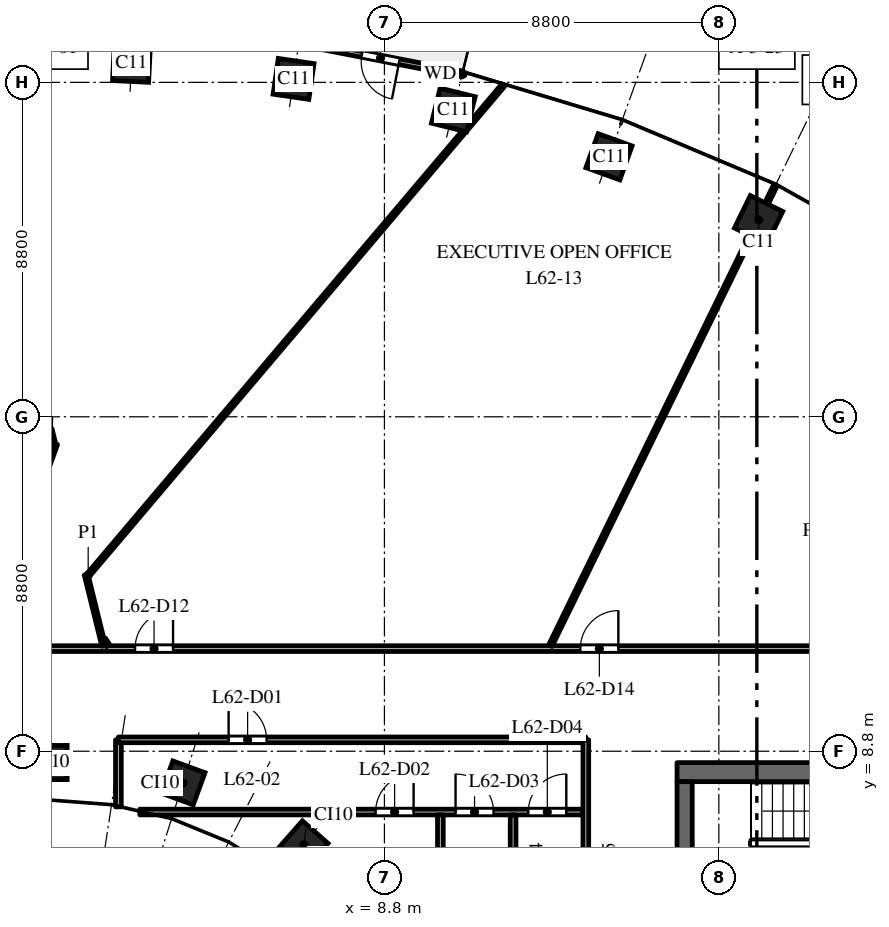
"""IFC4 building model, lengths in metres.
Left out: names, types, materials, properties, quantities, classifications, styles, units other than length and angle.
Written with IfcOpenShell. Run it as: python <this file> out.ifc"""

import sys

from ifc_helpers import new_model, si_unit, direction, frame, frame_2d, origin, origin_2d, place, context, subcontext, project, spatial, rectangle, extrude, element, fill, save


model = new_model("IFC4")
c1 = context("Model", 3, precision=1e-05, world=origin(), true_north=direction((0.0, 1.0)))
c2 = subcontext(c1, "Body", "Model", "MODEL_VIEW")
j1 = project(units=[si_unit("LENGTHUNIT", "METRE"), si_unit("PLANEANGLEUNIT", "RADIAN")], contexts=[c1])
p1 = place(None, origin())
s1 = spatial("IfcSite", under=j1, at=p1, CompositionType="ELEMENT")
p2 = place(p1, origin())
s2 = spatial("IfcBuilding", under=s1, at=p2, CompositionType="ELEMENT")
p3 = place(p2, frame((0.0, 0.0, 291.0)))
s3 = spatial("IfcBuildingStorey", under=s2, at=p3, CompositionType="ELEMENT", Elevation=291.0)
for number, where, z_axis, x_axis in (
    (1, (18.646, 22.785, 0.0), (0.0, 0.0, 1.0), (-0.898, 0.439, 0.0)),
    (2, (14.709, 24.441, 0.0), (0.0, 0.0, 1.0), (-0.941, 0.338, 0.0)),
    (3, (10.613, 25.674, 0.0), (0.0, 0.0, 1.0), (-0.971, 0.24, 0.0)),
    (4, (6.409, 26.491, 0.0), (0.0, 0.0, 1.0), (-0.99, 0.143, 0.0)),
    (5, (2.143, 26.898, 0.0), (0.0, 0.0, 1.0), (-0.999, 0.048, 0.0)),
):
    element("IfcColumn", number, at=place(p3, frame(where, z_axis=z_axis, x_axis=x_axis)), inside=s3, PredefinedType="COLUMN", context=c2, shape_type="SweptSolid", body=[
        extrude(rectangle(XDim=0.95, YDim=0.95, at=origin_2d()), origin(), (0.0, 0.0, 1.0), 4.0),
    ])
for number, where, z_axis, x_axis in (
    (6, (6.682, 6.334, 0.0), (0.0, 0.0, 1.0), (-0.751, 0.66, 0.0)),
    (7, (3.501, 7.967, 0.0), (0.0, 0.0, 1.0), (-0.939, 0.344, 0.0)),
    (8, (0.0, 8.503, 0.0), (0.0, 0.0, 1.0), (-1.0, 0.0, 0.0)),
):
    element("IfcColumn", number, at=place(p3, frame(where, z_axis=z_axis, x_axis=x_axis)), inside=s3, PredefinedType="COLUMN", context=c2, shape_type="SweptSolid", body=[
        extrude(rectangle(XDim=0.9, YDim=0.9, at=origin_2d()), origin(), (0.0, 0.0, 1.0), 4.0),
    ])
p4 = place(p3, frame((16.5, 8.25, 0.0), z_axis=(0.0, 0.0, 1.0), x_axis=(1.0, 0.0, 0.0)))
e9 = element("IfcWall", 9, at=p4, inside=s3, PredefinedType="SHEAR", context=c2, shape_type="SweptSolid", body=[
    extrude(rectangle(XDim=15.0, YDim=0.5, at=frame_2d((7.5, 0.0))), origin(), (0.0, 0.0, 1.0), 3.7),
])
p5 = place(p4, frame((6.9, 0.0, 0.0)))
e10 = element("IfcOpeningElement", 10, at=p5, cuts=e9, PredefinedType="OPENING", context=c2, shape_type="SweptSolid", body=[
    extrude(rectangle(XDim=1.2, YDim=2.1, at=frame_2d((0.6, 1.05))), frame((0.0, 0.26, 0.0), z_axis=(0.0, -1.0, 0.0), x_axis=(1.0, 0.0, 0.0)), (0.0, 0.0, 1.0), 0.52),
])
p6 = place(p4, frame((12.275, 0.0, 0.0)))
e11 = element("IfcOpeningElement", 11, at=p6, cuts=e9, PredefinedType="OPENING", context=c2, shape_type="SweptSolid", body=[
    extrude(rectangle(XDim=0.9, YDim=2.1, at=frame_2d((0.45, 1.05))), frame((0.0, 0.26, 0.0), z_axis=(0.0, -1.0, 0.0), x_axis=(1.0, 0.0, 0.0)), (0.0, 0.0, 1.0), 0.52),
])
p7 = place(p3, frame((16.7, -8.0, 0.0), z_axis=(0.0, 0.0, 1.0), x_axis=(0.0, 1.0, 0.0)))
e12 = element("IfcWall", 12, at=p7, inside=s3, PredefinedType="SHEAR", context=c2, shape_type="SweptSolid", body=[
    extrude(rectangle(XDim=16.0, YDim=0.4, at=frame_2d((8.0, 0.0))), origin(), (0.0, 0.0, 1.0), 3.7),
])
p8 = place(p3, frame((10.871, 26.617, 0.0), z_axis=(0.0, 0.0, 1.0), x_axis=(-0.981631174778, 0.190788460615, 0.0)))
e13 = element("IfcWall", 13, at=p8, inside=s3, PredefinedType="STANDARD", context=c2, shape_type="SweptSolid", body=[
    extrude(rectangle(XDim=4.426, YDim=0.15, at=frame_2d((2.213, 0.0))), origin(), (0.0, 0.0, 1.0), 3.7),
])
p9 = place(p8, frame((1.713, 0.0, 0.0)))
e14 = element("IfcOpeningElement", 14, at=p9, cuts=e13, PredefinedType="OPENING", context=c2, shape_type="SweptSolid", body=[
    extrude(rectangle(XDim=1.0, YDim=2.4, at=frame_2d((0.5, 1.2))), frame((0.0, 0.085, 0.0), z_axis=(0.0, -1.0, 0.0), x_axis=(1.0, 0.0, 0.0)), (0.0, 0.0, 1.0), 0.17),
])
p10 = place(p3, frame((-31.5, 11.5, 0.0), z_axis=(0.0, 0.0, 1.0), x_axis=(1.0, 0.0, 0.0)))
e15 = element("IfcWall", 15, at=p10, inside=s3, PredefinedType="PARTITIONING", context=c2, shape_type="SweptSolid", body=[
    extrude(rectangle(XDim=63.0, YDim=0.15, at=frame_2d((31.5, 0.0))), origin(), (0.0, 0.0, 1.0), 2.75),
])
p11 = place(p10, frame((16.471, 0.0, 0.0)))
e16 = element("IfcOpeningElement", 16, at=p11, cuts=e15, PredefinedType="OPENING", context=c2, shape_type="SweptSolid", body=[
    extrude(rectangle(XDim=1.0, YDim=2.1, at=frame_2d((0.5, 1.05))), frame((0.0, 0.085, 0.0), z_axis=(0.0, -1.0, 0.0), x_axis=(1.0, 0.0, 0.0)), (0.0, 0.0, 1.0), 0.17),
])
p12 = place(p10, frame((19.062, 0.0, 0.0)))
e17 = element("IfcOpeningElement", 17, at=p12, cuts=e15, PredefinedType="OPENING", context=c2, shape_type="SweptSolid", body=[
    extrude(rectangle(XDim=1.0, YDim=2.1, at=frame_2d((0.5, 1.05))), frame((0.0, 0.085, 0.0), z_axis=(0.0, -1.0, 0.0), x_axis=(1.0, 0.0, 0.0)), (0.0, 0.0, 1.0), 0.17),
])
p13 = place(p10, frame((26.531, 0.0, 0.0)))
e18 = element("IfcOpeningElement", 18, at=p13, cuts=e15, PredefinedType="OPENING", context=c2, shape_type="SweptSolid", body=[
    extrude(rectangle(XDim=1.0, YDim=2.1, at=frame_2d((0.5, 1.05))), frame((0.0, 0.085, 0.0), z_axis=(0.0, -1.0, 0.0), x_axis=(1.0, 0.0, 0.0)), (0.0, 0.0, 1.0), 0.17),
])
p14 = place(p10, frame((33.738, 0.0, 0.0)))
e19 = element("IfcOpeningElement", 19, at=p14, cuts=e15, PredefinedType="OPENING", context=c2, shape_type="SweptSolid", body=[
    extrude(rectangle(XDim=1.0, YDim=2.1, at=frame_2d((0.5, 1.05))), frame((0.0, 0.085, 0.0), z_axis=(0.0, -1.0, 0.0), x_axis=(1.0, 0.0, 0.0)), (0.0, 0.0, 1.0), 0.17),
])
p15 = place(p10, frame((45.456, 0.0, 0.0)))
e20 = element("IfcOpeningElement", 20, at=p15, cuts=e15, PredefinedType="OPENING", context=c2, shape_type="SweptSolid", body=[
    extrude(rectangle(XDim=1.0, YDim=2.1, at=frame_2d((0.5, 1.05))), frame((0.0, 0.085, 0.0), z_axis=(0.0, -1.0, 0.0), x_axis=(1.0, 0.0, 0.0)), (0.0, 0.0, 1.0), 0.17),
])
p16 = place(p10, frame((57.85, 0.0, 0.0)))
e21 = element("IfcOpeningElement", 21, at=p16, cuts=e15, PredefinedType="OPENING", context=c2, shape_type="SweptSolid", body=[
    extrude(rectangle(XDim=1.0, YDim=2.1, at=frame_2d((0.5, 1.05))), frame((0.0, 0.085, 0.0), z_axis=(0.0, -1.0, 0.0), x_axis=(1.0, 0.0, 0.0)), (0.0, 0.0, 1.0), 0.17),
])
p17 = place(p3, frame((-0.041, 16.352, 0.0), z_axis=(0.0, 0.0, 1.0), x_axis=(0.339570618506, 0.940580562763, 0.0)))
e22 = element("IfcWall", 22, at=p17, inside=s3, PredefinedType="PARTITIONING", context=c2, shape_type="SweptSolid", body=[
    extrude(rectangle(XDim=0.569, YDim=0.1, at=frame_2d((0.284, 0.0))), origin(), (0.0, 0.0, 1.0), 3.7),
])
p18 = place(p3, frame((0.003, 17.282, 0.0), z_axis=(0.0, 0.0, 1.0), x_axis=(0.238966259399, -0.971027871314, 0.0)))
e23 = element("IfcWall", 23, at=p18, inside=s3, PredefinedType="PARTITIONING", context=c2, shape_type="SweptSolid", body=[
    extrude(rectangle(XDim=0.403, YDim=0.1, at=frame_2d((0.201, 0.0))), origin(), (0.0, 0.0, 1.0), 3.7),
])
p19 = place(p3, frame((0.95, 13.448, 0.0), z_axis=(0.0, 0.0, 1.0), x_axis=(0.239556864004, -0.970882335254, 0.0)))
e24 = element("IfcWall", 24, at=p19, inside=s3, PredefinedType="PARTITIONING", context=c2, shape_type="SweptSolid", body=[
    extrude(rectangle(XDim=1.929, YDim=0.1, at=frame_2d((0.965, 0.0))), origin(), (0.0, 0.0, 1.0), 3.7),
])
p20 = place(p3, frame((1.005, 13.435, 0.0), z_axis=(0.0, 0.0, 1.0), x_axis=(0.646459104718, 0.762948639115, 0.0)))
e25 = element("IfcWall", 25, at=p20, inside=s3, PredefinedType="PARTITIONING", context=c2, shape_type="SweptSolid", body=[
    extrude(rectangle(XDim=16.892, YDim=0.1, at=frame_2d((8.446, 0.0))), origin(), (0.0, 0.0, 1.0), 2.85),
])
p21 = place(p3, frame((1.416, 11.753, 0.0), z_axis=(0.0, 0.0, 1.0), x_axis=(0.542473755858, -0.840072749353, 0.0)))
e26 = element("IfcWall", 26, at=p21, inside=s3, PredefinedType="PARTITIONING", context=c2, shape_type="SweptSolid", body=[
    extrude(rectangle(XDim=0.208, YDim=0.1, at=frame_2d((0.104, 0.0))), origin(), (0.0, 0.0, 1.0), 3.7),
])
p22 = place(p3, frame((1.8, 7.336, 0.0), z_axis=(0.0, 0.0, 1.0), x_axis=(0.0, 1.0, 0.0)))
e27 = element("IfcWall", 27, at=p22, inside=s3, PredefinedType="PARTITIONING", context=c2, shape_type="SweptSolid", body=[
    extrude(rectangle(XDim=1.764, YDim=0.15, at=frame_2d((0.882, 0.0))), origin(), (0.0, 0.0, 1.0), 3.0),
])
p23 = place(p3, frame((1.8, 9.1, 0.0), z_axis=(0.0, 0.0, 1.0), x_axis=(1.0, 0.0, 0.0)))
e28 = element("IfcWall", 28, at=p23, inside=s3, PredefinedType="PARTITIONING", context=c2, shape_type="SweptSolid", body=[
    extrude(rectangle(XDim=12.3, YDim=0.15, at=frame_2d((6.15, 0.0))), origin(), (0.0, 0.0, 1.0), 2.85),
])
p24 = place(p23, frame((2.9, 0.0, 0.0)))
e29 = element("IfcOpeningElement", 29, at=p24, cuts=e28, PredefinedType="OPENING", context=c2, shape_type="SweptSolid", body=[
    extrude(rectangle(XDim=1.0, YDim=2.1, at=frame_2d((0.5, 1.05))), frame((0.0, 0.085, 0.0), z_axis=(0.0, -1.0, 0.0), x_axis=(1.0, 0.0, 0.0)), (0.0, 0.0, 1.0), 0.17),
])
p25 = place(p3, frame((2.364, 7.2, 0.0), z_axis=(0.0, 0.0, 1.0), x_axis=(1.0, 0.0, 0.0)))
e30 = element("IfcWall", 30, at=p25, inside=s3, PredefinedType="PARTITIONING", context=c2, shape_type="SweptSolid", body=[
    extrude(rectangle(XDim=11.661, YDim=0.15, at=frame_2d((5.831, 0.0))), origin(), (0.0, 0.0, 1.0), 2.75),
])
p26 = place(p25, frame((6.204, 0.0, 0.0)))
e31 = element("IfcOpeningElement", 31, at=p26, cuts=e30, PredefinedType="OPENING", context=c2, shape_type="SweptSolid", body=[
    extrude(rectangle(XDim=1.0, YDim=2.1, at=frame_2d((0.5, 1.05))), frame((0.0, 0.085, 0.0), z_axis=(0.0, -1.0, 0.0), x_axis=(1.0, 0.0, 0.0)), (0.0, 0.0, 1.0), 0.17),
])
p27 = place(p25, frame((8.308, 0.0, 0.0)))
e32 = element("IfcOpeningElement", 32, at=p27, cuts=e30, PredefinedType="OPENING", context=c2, shape_type="SweptSolid", body=[
    extrude(rectangle(XDim=1.0, YDim=2.1, at=frame_2d((0.5, 1.05))), frame((0.0, 0.085, 0.0), z_axis=(0.0, -1.0, 0.0), x_axis=(1.0, 0.0, 0.0)), (0.0, 0.0, 1.0), 0.17),
])
p28 = place(p25, frame((10.222, 0.0, 0.0)))
e33 = element("IfcOpeningElement", 33, at=p28, cuts=e30, PredefinedType="OPENING", context=c2, shape_type="SweptSolid", body=[
    extrude(rectangle(XDim=1.0, YDim=2.1, at=frame_2d((0.5, 1.05))), frame((0.0, 0.085, 0.0), z_axis=(0.0, -1.0, 0.0), x_axis=(1.0, 0.0, 0.0)), (0.0, 0.0, 1.0), 0.17),
])
for number, where, z_axis, x_axis in (
    (34, (10.272, 4.17, 0.0), (0.0, 0.0, 1.0), (0.0, 1.0, 0.0)),
    (35, (12.186, 4.17, 0.0), (0.0, 0.0, 1.0), (0.0, 1.0, 0.0)),
):
    element("IfcWall", number, at=place(p3, frame(where, z_axis=z_axis, x_axis=x_axis)), inside=s3, PredefinedType="PARTITIONING", context=c2, shape_type="SweptSolid", body=[
        extrude(rectangle(XDim=2.955, YDim=0.15, at=frame_2d((1.478, 0.0))), origin(), (0.0, 0.0, 1.0), 2.75),
    ])
p29 = place(p3, frame((13.167, 11.579, 0.0), z_axis=(0.0, 0.0, 1.0), x_axis=(0.439238726833, 0.898370380661, 0.0)))
e36 = element("IfcWall", 36, at=p29, inside=s3, PredefinedType="PARTITIONING", context=c2, shape_type="SweptSolid", body=[
    extrude(rectangle(XDim=13.475, YDim=0.1, at=frame_2d((6.738, 0.0))), origin(), (0.0, 0.0, 1.0), 3.0),
])
p30 = place(p3, frame((14.1, 4.095, 0.0), z_axis=(0.0, 0.0, 1.0), x_axis=(0.0, 1.0, 0.0)))
e37 = element("IfcWall", 37, at=p30, inside=s3, PredefinedType="PARTITIONING", context=c2, shape_type="SweptSolid", body=[
    extrude(rectangle(XDim=5.005, YDim=0.15, at=frame_2d((2.502, 0.0))), origin(), (0.0, 0.0, 1.0), 2.75),
])
p31 = place(p9, origin())
e38 = element("IfcDoor", 38, at=p31, inside=s3, OperationType="SINGLE_SWING_LEFT", PredefinedType="DOOR", context=c2, shape_type="SweptSolid", body=[
    extrude(rectangle(XDim=1.0, YDim=2.4, at=frame_2d((0.5, 1.2))), frame((0.0, 0.025, 0.0), z_axis=(0.0, -1.0, 0.0), x_axis=(1.0, 0.0, 0.0)), (0.0, 0.0, 1.0), 0.05),
])
fill(e14, e38)
p32 = place(p24, origin())
e39 = element("IfcDoor", 39, at=p32, inside=s3, OperationType="SINGLE_SWING_LEFT", PredefinedType="DOOR", context=c2, shape_type="SweptSolid", body=[
    extrude(rectangle(XDim=1.0, YDim=2.1, at=frame_2d((0.5, 1.05))), frame((0.0, 0.025, 0.0), z_axis=(0.0, -1.0, 0.0), x_axis=(1.0, 0.0, 0.0)), (0.0, 0.0, 1.0), 0.05),
])
fill(e29, e39)
p33 = place(p26, origin())
e40 = element("IfcDoor", 40, at=p33, inside=s3, OperationType="SINGLE_SWING_RIGHT", PredefinedType="DOOR", context=c2, shape_type="SweptSolid", body=[
    extrude(rectangle(XDim=1.0, YDim=2.1, at=frame_2d((0.5, 1.05))), frame((0.0, 0.025, 0.0), z_axis=(0.0, -1.0, 0.0), x_axis=(1.0, 0.0, 0.0)), (0.0, 0.0, 1.0), 0.05),
])
fill(e31, e40)
p34 = place(p27, origin())
e41 = element("IfcDoor", 41, at=p34, inside=s3, OperationType="SINGLE_SWING_LEFT", PredefinedType="DOOR", context=c2, shape_type="SweptSolid", body=[
    extrude(rectangle(XDim=1.0, YDim=2.1, at=frame_2d((0.5, 1.05))), frame((0.0, 0.025, 0.0), z_axis=(0.0, -1.0, 0.0), x_axis=(1.0, 0.0, 0.0)), (0.0, 0.0, 1.0), 0.05),
])
fill(e32, e41)
p35 = place(p28, origin())
e42 = element("IfcDoor", 42, at=p35, inside=s3, OperationType="SINGLE_SWING_RIGHT", PredefinedType="DOOR", context=c2, shape_type="SweptSolid", body=[
    extrude(rectangle(XDim=1.0, YDim=2.1, at=frame_2d((0.5, 1.05))), frame((0.0, 0.025, 0.0), z_axis=(0.0, -1.0, 0.0), x_axis=(1.0, 0.0, 0.0)), (0.0, 0.0, 1.0), 0.05),
])
fill(e33, e42)
p36 = place(p14, origin())
e43 = element("IfcDoor", 43, at=p36, inside=s3, OperationType="SINGLE_SWING_RIGHT", PredefinedType="DOOR", context=c2, shape_type="SweptSolid", body=[
    extrude(rectangle(XDim=1.0, YDim=2.1, at=frame_2d((0.5, 1.05))), frame((0.0, 0.025, 0.0), z_axis=(0.0, -1.0, 0.0), x_axis=(1.0, 0.0, 0.0)), (0.0, 0.0, 1.0), 0.05),
])
fill(e19, e43)
p37 = place(p15, origin())
e44 = element("IfcDoor", 44, at=p37, inside=s3, OperationType="SINGLE_SWING_RIGHT", PredefinedType="DOOR", context=c2, shape_type="SweptSolid", body=[
    extrude(rectangle(XDim=1.0, YDim=2.1, at=frame_2d((0.5, 1.05))), frame((0.0, 0.025, 0.0), z_axis=(0.0, -1.0, 0.0), x_axis=(1.0, 0.0, 0.0)), (0.0, 0.0, 1.0), 0.05),
])
fill(e20, e44)
save(model, sys.argv[1])
